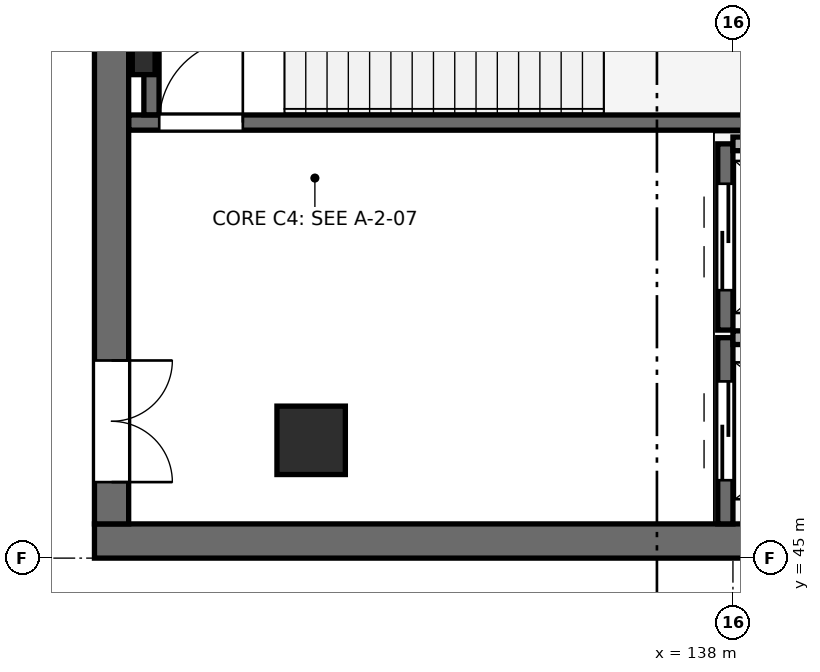
"""IFC4 building model, lengths in metres.
Left out: names, types, materials, properties, quantities, classifications, styles, units other than length and angle.
Written with IfcOpenShell. Run it as: python <this file> out.ifc"""

import sys

from ifc_helpers import new_model, si_unit, direction, frame, frame_2d, origin, origin_2d, place, context, subcontext, project, spatial, rectangle, i_section, extrude, element, fill, save


model = new_model("IFC4")
c1 = context("Model", 3, precision=1e-05, world=origin(), true_north=direction((0.0, 1.0)))
c2 = subcontext(c1, "Body", "Model", "MODEL_VIEW")
j1 = project(units=[si_unit("LENGTHUNIT", "METRE"), si_unit("PLANEANGLEUNIT", "RADIAN")], contexts=[c1])
p1 = place(None, origin())
s1 = spatial("IfcSite", under=j1, at=p1, CompositionType="ELEMENT")
p2 = place(p1, origin())
s2 = spatial("IfcBuilding", under=s1, at=p2, CompositionType="ELEMENT")
p3 = place(p2, frame((0.0, 0.0, -5.4)))
s3 = spatial("IfcBuildingStorey", under=s2, at=p3, CompositionType="ELEMENT", Elevation=-5.4)
p4 = place(p3, frame((132.451, 46.55, 0.0), z_axis=(0.0, 0.0, 1.0), x_axis=(1.0, 0.0, 0.0)))
e1 = element("IfcColumn", 1, at=p4, inside=s3, PredefinedType="COLUMN", context=c2, shape_type="SweptSolid", body=[
    extrude(rectangle(XDim=0.9, YDim=0.9, at=origin_2d()), origin(), (0.0, 0.0, 1.0), 5.4),
])
p5 = place(p3, frame((129.6, 45.225, 0.0), z_axis=(0.0, 0.0, 1.0), x_axis=(1.0, 0.0, 0.0)))
e2 = element("IfcWall", 2, at=p5, inside=s3, PredefinedType="SHEAR", context=c2, shape_type="SweptSolid", body=[
    extrude(rectangle(XDim=11.4, YDim=0.45, at=frame_2d((5.7, 0.0))), origin(), (0.0, 0.0, 1.0), 5.4),
])
p6 = place(p3, frame((129.825, 45.45, 0.0), z_axis=(0.0, 0.0, 1.0), x_axis=(0.0, 1.0, 0.0)))
e3 = element("IfcWall", 3, at=p6, inside=s3, PredefinedType="SHEAR", context=c2, shape_type="SweptSolid", body=[
    extrude(rectangle(XDim=9.1, YDim=0.45, at=frame_2d((4.55, 0.0))), origin(), (0.0, 0.0, 1.0), 5.4),
])
p7 = place(p6, frame((0.55, 0.0, 0.0)))
e4 = element("IfcOpeningElement", 4, at=p7, cuts=e3, PredefinedType="OPENING", context=c2, shape_type="SweptSolid", body=[
    extrude(rectangle(XDim=1.6, YDim=2.2, at=frame_2d((0.8, 1.1))), frame((0.0, 0.235, 0.0), z_axis=(0.0, -1.0, 0.0), x_axis=(1.0, 0.0, 0.0)), (0.0, 0.0, 1.0), 0.47),
])
p8 = place(p3, frame((130.248, 51.611, 0.0), z_axis=(0.0, 0.0, 1.0), x_axis=(1.0, 0.0, 0.0)))
e5 = element("IfcColumn", 5, at=p8, inside=s3, PredefinedType="COLUMN", context=c2, shape_type="SweptSolid", body=[
    extrude(i_section(OverallWidth=0.3, OverallDepth=0.5, WebThickness=0.014, FlangeThickness=0.028, FilletRadius=0.027, at=origin_2d()), origin(), (0.0, 0.0, 1.0), 5.4),
])
p9 = place(p3, frame((137.9, 45.45, 0.0), z_axis=(0.0, 0.0, 1.0), x_axis=(0.0, 1.0, 0.0)))
e6 = element("IfcWall", 6, at=p9, inside=s3, PredefinedType="SHEAR", context=c2, shape_type="SweptSolid", body=[
    extrude(rectangle(XDim=2.45, YDim=0.2, at=frame_2d((1.225, 0.0))), origin(), (0.0, 0.0, 1.0), 5.04),
])
p10 = place(p9, frame((0.575, 0.0, 0.0)))
e7 = element("IfcOpeningElement", 7, at=p10, cuts=e6, PredefinedType="OPENING", context=c2, shape_type="SweptSolid", body=[
    extrude(rectangle(XDim=1.3, YDim=2.2, at=frame_2d((0.65, 1.1))), frame((0.0, 0.11, 0.0), z_axis=(0.0, -1.0, 0.0), x_axis=(1.0, 0.0, 0.0)), (0.0, 0.0, 1.0), 0.22),
])
p11 = place(p3, frame((138.0, 47.9, 0.0), z_axis=(0.0, 0.0, 1.0), x_axis=(1.0, 0.0, 0.0)))
e8 = element("IfcWall", 8, at=p11, inside=s3, PredefinedType="PARTITIONING", context=c2, shape_type="SweptSolid", body=[
    extrude(rectangle(XDim=2.45, YDim=0.18, at=frame_2d((1.225, 0.0))), origin(), (0.0, 0.0, 1.0), 5.4),
])
p12 = place(p3, frame((137.9, 48.0, 0.0), z_axis=(0.0, 0.0, 1.0), x_axis=(0.0, 1.0, 0.0)))
e9 = element("IfcWall", 9, at=p12, inside=s3, PredefinedType="SHEAR", context=c2, shape_type="SweptSolid", body=[
    extrude(rectangle(XDim=2.45, YDim=0.2, at=frame_2d((1.225, 0.0))), origin(), (0.0, 0.0, 1.0), 5.04),
])
p13 = place(p12, frame((0.525, 0.0, 0.0)))
e10 = element("IfcOpeningElement", 10, at=p13, cuts=e9, PredefinedType="OPENING", context=c2, shape_type="SweptSolid", body=[
    extrude(rectangle(XDim=1.4, YDim=2.2, at=frame_2d((0.7, 1.1))), frame((0.0, 0.11, 0.0), z_axis=(0.0, -1.0, 0.0), x_axis=(1.0, 0.0, 0.0)), (0.0, 0.0, 1.0), 0.22),
])
p14 = place(p3, frame((138.0, 50.45, 0.0), z_axis=(0.0, 0.0, 1.0), x_axis=(1.0, 0.0, 0.0)))
e11 = element("IfcWall", 11, at=p14, inside=s3, PredefinedType="PARTITIONING", context=c2, shape_type="SweptSolid", body=[
    extrude(rectangle(XDim=2.45, YDim=0.18, at=frame_2d((1.225, 0.0))), origin(), (0.0, 0.0, 1.0), 5.4),
])
p15 = place(p3, frame((130.052, 50.73, 0.0), z_axis=(0.0, 0.0, 1.0), x_axis=(1.0, 0.0, 0.0)))
e12 = element("IfcWall", 12, at=p15, inside=s3, PredefinedType="SHEAR", context=c2, shape_type="SweptSolid", body=[
    extrude(rectangle(XDim=8.248, YDim=0.2, at=frame_2d((4.124, 0.0))), origin(), (0.0, 0.0, 1.0), 5.4),
])
p16 = place(p15, frame((0.4, 0.0, 0.0)))
e13 = element("IfcOpeningElement", 13, at=p16, cuts=e12, PredefinedType="OPENING", context=c2, shape_type="SweptSolid", body=[
    extrude(rectangle(XDim=1.1, YDim=2.15, at=frame_2d((0.55, 1.075))), frame((0.0, 0.11, 0.0), z_axis=(0.0, -1.0, 0.0), x_axis=(1.0, 0.0, 0.0)), (0.0, 0.0, 1.0), 0.22),
])
p17 = place(p3, frame((130.35, 50.832, 0.0), z_axis=(0.0, 0.0, 1.0), x_axis=(0.0, 1.0, 0.0)))
e14 = element("IfcWall", 14, at=p17, inside=s3, PredefinedType="SHEAR", context=c2, shape_type="SweptSolid", body=[
    extrude(rectangle(XDim=3.686, YDim=0.2, at=frame_2d((1.843, 0.0))), origin(), (0.0, 0.0, 1.0), 5.4),
])
p18 = place(p10, origin())
e15 = element("IfcDoor", 15, at=p18, inside=s3, OperationType="DOUBLE_DOOR_SLIDING", PredefinedType="DOOR", context=c2, shape_type="SweptSolid", body=[
    extrude(rectangle(XDim=1.3, YDim=2.2, at=frame_2d((0.65, 1.1))), frame((0.0, 0.025, 0.0), z_axis=(0.0, -1.0, 0.0), x_axis=(1.0, 0.0, 0.0)), (0.0, 0.0, 1.0), 0.05),
])
fill(e7, e15)
p19 = place(p13, origin())
e16 = element("IfcDoor", 16, at=p19, inside=s3, OperationType="DOUBLE_DOOR_SLIDING", PredefinedType="DOOR", context=c2, shape_type="SweptSolid", body=[
    extrude(rectangle(XDim=1.4, YDim=2.2, at=frame_2d((0.7, 1.1))), frame((0.0, 0.025, 0.0), z_axis=(0.0, -1.0, 0.0), x_axis=(1.0, 0.0, 0.0)), (0.0, 0.0, 1.0), 0.05),
])
fill(e10, e16)
p20 = place(p16, frame((1.1, 0.0, 0.0), z_axis=(0.0, 0.0, 1.0), x_axis=(-1.0, 0.0, 0.0)))
e17 = element("IfcDoor", 17, at=p20, inside=s3, OperationType="SINGLE_SWING_LEFT", PredefinedType="DOOR", context=c2, shape_type="SweptSolid", body=[
    extrude(rectangle(XDim=1.1, YDim=2.15, at=frame_2d((0.55, 1.075))), frame((0.0, 0.025, 0.0), z_axis=(0.0, -1.0, 0.0), x_axis=(1.0, 0.0, 0.0)), (0.0, 0.0, 1.0), 0.05),
])
fill(e13, e17)
p21 = place(p7, frame((1.6, 0.0, 0.0), z_axis=(0.0, 0.0, 1.0), x_axis=(-1.0, 0.0, 0.0)))
e18 = element("IfcDoor", 18, at=p21, inside=s3, OperationType="DOUBLE_DOOR_SINGLE_SWING", PredefinedType="DOOR", context=c2, shape_type="SweptSolid", body=[
    extrude(rectangle(XDim=1.6, YDim=2.2, at=frame_2d((0.8, 1.1))), frame((0.0, 0.025, 0.0), z_axis=(0.0, -1.0, 0.0), x_axis=(1.0, 0.0, 0.0)), (0.0, 0.0, 1.0), 0.05),
])
fill(e4, e18)
save(model, sys.argv[1])
